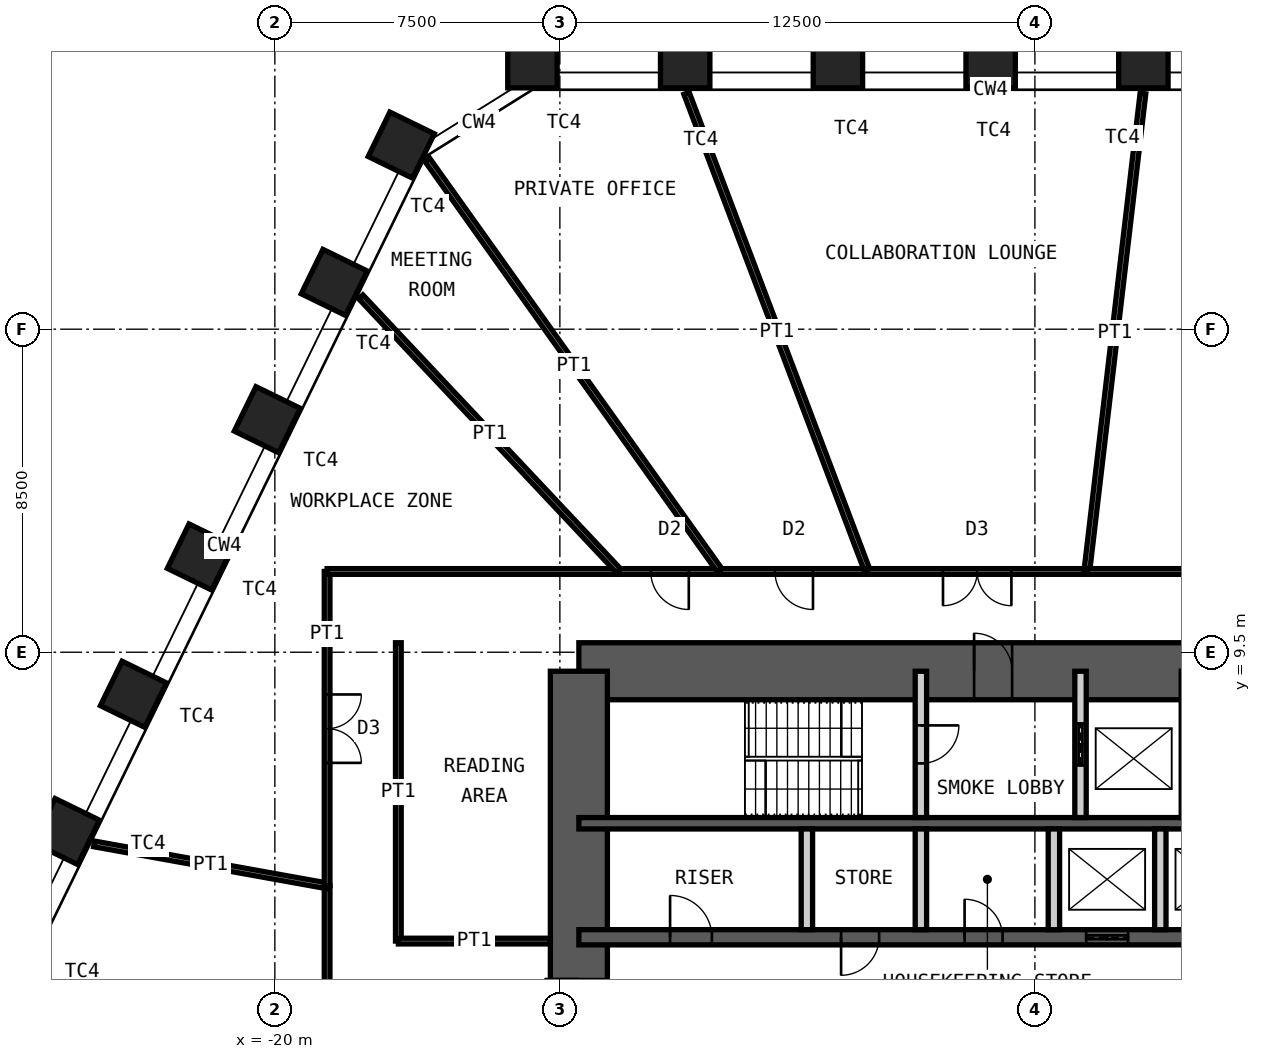
"""IFC4 building model, lengths in metres.
Left out: names, types, materials, properties, quantities, classifications, styles, units other than length and angle.
Written with IfcOpenShell. Run it as: python <this file> out.ifc"""

import sys

from ifc_helpers import new_model, si_unit, direction, frame, frame_2d, origin, origin_2d, place, context, subcontext, project, spatial, rectangle, hollow_rectangle, extrude, element, fill, save


model = new_model("IFC4")
c1 = context("Model", 3, precision=1e-05, world=origin(), true_north=direction((0.0, 1.0)))
c2 = subcontext(c1, "Body", "Model", "MODEL_VIEW")
j1 = project(units=[si_unit("LENGTHUNIT", "METRE"), si_unit("PLANEANGLEUNIT", "RADIAN")], contexts=[c1])
p1 = place(None, origin())
s1 = spatial("IfcSite", under=j1, at=p1, CompositionType="ELEMENT")
p2 = place(p1, origin())
s2 = spatial("IfcBuilding", under=s1, at=p2, CompositionType="ELEMENT")
p3 = place(p2, frame((0.0, 0.0, 153.4)))
s3 = spatial("IfcBuildingStorey", under=s2, at=p3, CompositionType="ELEMENT", Elevation=153.4)
for number, where, z_axis, x_axis in (
    (1, (-13.222, 25.0, 0.0), (0.0, 0.0, 1.0), (-1.0, 0.0, 0.0)),
    (2, (-9.203, 25.0, 0.0), (0.0, 0.0, 1.0), (-1.0, 0.0, 0.0)),
    (3, (-5.184, 25.0, 0.0), (0.0, 0.0, 1.0), (-1.0, 0.0, 0.0)),
    (4, (-1.165, 25.0, 0.0), (0.0, 0.0, 1.0), (-1.0, 0.0, 0.0)),
    (5, (2.854, 25.0, 0.0), (0.0, 0.0, 1.0), (-1.0, 0.0, 0.0)),
    (6, (-25.483, 4.781, 0.0), (0.0, 0.0, 1.0), (-0.438, -0.899, 0.0)),
    (7, (-23.721, 8.394, 0.0), (0.0, 0.0, 1.0), (-0.438, -0.899, 0.0)),
    (8, (-21.959, 12.006, 0.0), (0.0, 0.0, 1.0), (-0.438, -0.899, 0.0)),
    (9, (-20.198, 15.618, 0.0), (0.0, 0.0, 1.0), (-0.438, -0.899, 0.0)),
    (10, (-18.436, 19.23, 0.0), (0.0, 0.0, 1.0), (-0.438, -0.899, 0.0)),
    (11, (-16.674, 22.843, 0.0), (0.0, 0.0, 1.0), (-0.438, -0.899, 0.0)),
):
    element("IfcColumn", number, at=place(p3, frame(where, z_axis=z_axis, x_axis=x_axis)), inside=s3, PredefinedType="COLUMN", context=c2, shape_type="SweptSolid", body=[
        extrude(hollow_rectangle(XDim=1.3, YDim=1.3, WallThickness=0.1, at=origin_2d()), origin(), (0.0, 0.0, 1.0), 4.2),
    ])
p4 = place(p3, frame((-12.0, 9.0, 0.0), z_axis=(0.0, 0.0, 1.0), x_axis=(1.0, 0.0, 0.0)))
e12 = element("IfcWall", 12, at=p4, inside=s3, PredefinedType="SHEAR", context=c2, shape_type="SweptSolid", body=[
    extrude(rectangle(XDim=24.0, YDim=1.5, at=frame_2d((12.0, 0.0))), origin(), (0.0, 0.0, 1.0), 4.2),
])
p5 = place(p4, frame((10.4, 0.0, 0.0)))
e13 = element("IfcOpeningElement", 13, at=p5, cuts=e12, PredefinedType="OPENING", context=c2, shape_type="SweptSolid", body=[
    extrude(rectangle(XDim=1.0, YDim=2.1, at=frame_2d((0.5, 1.05))), frame((0.0, 0.76, 0.0), z_axis=(0.0, -1.0, 0.0), x_axis=(1.0, 0.0, 0.0)), (0.0, 0.0, 1.0), 1.52),
])
p6 = place(p4, frame((17.6, 0.0, 0.0)))
e14 = element("IfcOpeningElement", 14, at=p6, cuts=e12, PredefinedType="OPENING", context=c2, shape_type="SweptSolid", body=[
    extrude(rectangle(XDim=0.9, YDim=2.1, at=frame_2d((0.45, 1.05))), frame((0.0, 0.76, 0.0), z_axis=(0.0, -1.0, 0.0), x_axis=(1.0, 0.0, 0.0)), (0.0, 0.0, 1.0), 1.52),
])
p7 = place(p4, frame((21.9, 0.0, 0.0)))
e15 = element("IfcOpeningElement", 15, at=p7, cuts=e12, PredefinedType="OPENING", context=c2, shape_type="SweptSolid", body=[
    extrude(rectangle(XDim=0.9, YDim=2.1, at=frame_2d((0.45, 1.05))), frame((0.0, 0.76, 0.0), z_axis=(0.0, -1.0, 0.0), x_axis=(1.0, 0.0, 0.0)), (0.0, 0.0, 1.0), 1.52),
])
p8 = place(p3, frame((-12.0, -9.0, 0.0), z_axis=(0.0, 0.0, 1.0), x_axis=(0.0, 1.0, 0.0)))
e16 = element("IfcWall", 16, at=p8, inside=s3, PredefinedType="SHEAR", context=c2, shape_type="SweptSolid", body=[
    extrude(rectangle(XDim=18.0, YDim=1.5, at=frame_2d((9.0, 0.0))), origin(), (0.0, 0.0, 1.0), 4.2),
])
p9 = place(p8, frame((8.1, 0.0, 0.0)))
e17 = element("IfcOpeningElement", 17, at=p9, cuts=e16, PredefinedType="OPENING", context=c2, shape_type="SweptSolid", body=[
    extrude(rectangle(XDim=1.8, YDim=2.1, at=frame_2d((0.9, 1.05))), frame((0.0, 0.76, 0.0), z_axis=(0.0, -1.0, 0.0), x_axis=(1.0, 0.0, 0.0)), (0.0, 0.0, 1.0), 1.52),
])
p10 = place(p3, frame((-12.0, 5.0, 0.0), z_axis=(0.0, 0.0, 1.0), x_axis=(1.0, 0.0, 0.0)))
e18 = element("IfcWall", 18, at=p10, inside=s3, PredefinedType="SHEAR", context=c2, shape_type="SweptSolid", body=[
    extrude(rectangle(XDim=24.0, YDim=0.3, at=frame_2d((12.0, 0.0))), origin(), (0.0, 0.0, 1.0), 4.2),
])
p11 = place(p3, frame((-12.0, 2.0, 0.0), z_axis=(0.0, 0.0, 1.0), x_axis=(1.0, 0.0, 0.0)))
e19 = element("IfcWall", 19, at=p11, inside=s3, PredefinedType="SHEAR", context=c2, shape_type="SweptSolid", body=[
    extrude(rectangle(XDim=24.0, YDim=0.4, at=frame_2d((12.0, 0.0))), origin(), (0.0, 0.0, 1.0), 4.2),
])
p12 = place(p11, frame((2.4, 0.0, 0.0)))
e20 = element("IfcOpeningElement", 20, at=p12, cuts=e19, PredefinedType="OPENING", context=c2, shape_type="SweptSolid", body=[
    extrude(rectangle(XDim=1.1, YDim=2.1, at=frame_2d((0.55, 1.05))), frame((0.0, 0.21, 0.0), z_axis=(0.0, -1.0, 0.0), x_axis=(1.0, 0.0, 0.0)), (0.0, 0.0, 1.0), 0.42),
])
p13 = place(p11, frame((22.0, 0.0, 0.0)))
e21 = element("IfcOpeningElement", 21, at=p13, cuts=e19, PredefinedType="OPENING", context=c2, shape_type="SweptSolid", body=[
    extrude(rectangle(XDim=1.1, YDim=2.1, at=frame_2d((0.55, 1.05))), frame((0.0, 0.21, 0.0), z_axis=(0.0, -1.0, 0.0), x_axis=(1.0, 0.0, 0.0)), (0.0, 0.0, 1.0), 0.42),
])
p14 = place(p11, frame((10.15, 0.0, 0.0)))
e22 = element("IfcOpeningElement", 22, at=p14, cuts=e19, PredefinedType="OPENING", context=c2, shape_type="SweptSolid", body=[
    extrude(rectangle(XDim=1.0, YDim=2.1, at=frame_2d((0.5, 1.05))), frame((0.0, 0.21, 0.0), z_axis=(0.0, -1.0, 0.0), x_axis=(1.0, 0.0, 0.0)), (0.0, 0.0, 1.0), 0.42),
])
p15 = place(p11, frame((6.9, 0.0, 0.0)))
e23 = element("IfcOpeningElement", 23, at=p15, cuts=e19, PredefinedType="OPENING", context=c2, shape_type="SweptSolid", body=[
    extrude(rectangle(XDim=1.0, YDim=2.1, at=frame_2d((0.5, 1.05))), frame((0.0, 0.21, 0.0), z_axis=(0.0, -1.0, 0.0), x_axis=(1.0, 0.0, 0.0)), (0.0, 0.0, 1.0), 0.42),
])
p16 = place(p11, frame((13.35, 0.0, 0.0)))
e24 = element("IfcOpeningElement", 24, at=p16, cuts=e19, PredefinedType="OPENING", context=c2, shape_type="SweptSolid", body=[
    extrude(rectangle(XDim=1.1, YDim=2.4, at=frame_2d((0.55, 1.2))), frame((0.0, 0.21, 0.0), z_axis=(0.0, -1.0, 0.0), x_axis=(1.0, 0.0, 0.0)), (0.0, 0.0, 1.0), 0.42),
])
p17 = place(p11, frame((16.15, 0.0, 0.0)))
e25 = element("IfcOpeningElement", 25, at=p17, cuts=e19, PredefinedType="OPENING", context=c2, shape_type="SweptSolid", body=[
    extrude(rectangle(XDim=1.1, YDim=2.4, at=frame_2d((0.55, 1.2))), frame((0.0, 0.21, 0.0), z_axis=(0.0, -1.0, 0.0), x_axis=(1.0, 0.0, 0.0)), (0.0, 0.0, 1.0), 0.42),
])
p18 = place(p11, frame((18.95, 0.0, 0.0)))
e26 = element("IfcOpeningElement", 26, at=p18, cuts=e19, PredefinedType="OPENING", context=c2, shape_type="SweptSolid", body=[
    extrude(rectangle(XDim=1.1, YDim=2.4, at=frame_2d((0.55, 1.2))), frame((0.0, 0.21, 0.0), z_axis=(0.0, -1.0, 0.0), x_axis=(1.0, 0.0, 0.0)), (0.0, 0.0, 1.0), 0.42),
])
p19 = place(p3, frame((-3.0, 5.15, 0.0), z_axis=(0.0, 0.0, 1.0), x_axis=(0.0, 1.0, 0.0)))
e27 = element("IfcWall", 27, at=p19, inside=s3, PredefinedType="PARTITIONING", context=c2, shape_type="SweptSolid", body=[
    extrude(rectangle(XDim=3.85, YDim=0.3, at=frame_2d((1.925, 0.0))), origin(), (0.0, 0.0, 1.0), 3.98),
])
p20 = place(p19, frame((1.425, 0.0, 0.0)))
e28 = element("IfcOpeningElement", 28, at=p20, cuts=e27, PredefinedType="OPENING", context=c2, shape_type="SweptSolid", body=[
    extrude(rectangle(XDim=1.0, YDim=2.1, at=frame_2d((0.5, 1.05))), frame((0.0, 0.16, 0.0), z_axis=(0.0, -1.0, 0.0), x_axis=(1.0, 0.0, 0.0)), (0.0, 0.0, 1.0), 0.32),
])
p21 = place(p3, frame((1.2, 5.15, 0.0), z_axis=(0.0, 0.0, 1.0), x_axis=(0.0, 1.0, 0.0)))
e29 = element("IfcWall", 29, at=p21, inside=s3, PredefinedType="PARTITIONING", context=c2, shape_type="SweptSolid", body=[
    extrude(rectangle(XDim=3.85, YDim=0.3, at=frame_2d((1.925, 0.0))), origin(), (0.0, 0.0, 1.0), 3.98),
])
p22 = place(p21, frame((1.375, 0.0, 0.0)))
e30 = element("IfcOpeningElement", 30, at=p22, cuts=e29, PredefinedType="OPENING", context=c2, shape_type="SweptSolid", body=[
    extrude(rectangle(XDim=1.1, YDim=2.4, at=frame_2d((0.55, 1.2))), frame((0.0, 0.16, 0.0), z_axis=(0.0, -1.0, 0.0), x_axis=(1.0, 0.0, 0.0)), (0.0, 0.0, 1.0), 0.32),
])
p23 = place(p3, frame((4.0, 5.15, 0.0), z_axis=(0.0, 0.0, 1.0), x_axis=(0.0, 1.0, 0.0)))
e31 = element("IfcWall", 31, at=p23, inside=s3, PredefinedType="PARTITIONING", context=c2, shape_type="SweptSolid", body=[
    extrude(rectangle(XDim=3.85, YDim=0.3, at=frame_2d((1.925, 0.0))), origin(), (0.0, 0.0, 1.0), 3.98),
])
for number, where, z_axis, x_axis in (
    (32, (-6.0, 2.2, 0.0), (0.0, 0.0, 1.0), (0.0, 1.0, 0.0)),
    (33, (-3.0, 2.2, 0.0), (0.0, 0.0, 1.0), (0.0, 1.0, 0.0)),
    (34, (0.5, 2.2, 0.0), (0.0, 0.0, 1.0), (0.0, 1.0, 0.0)),
    (35, (3.3, 2.2, 0.0), (0.0, 0.0, 1.0), (0.0, 1.0, 0.0)),
):
    element("IfcWall", number, at=place(p3, frame(where, z_axis=z_axis, x_axis=x_axis)), inside=s3, PredefinedType="PARTITIONING", context=c2, shape_type="SweptSolid", body=[
        extrude(rectangle(XDim=2.65, YDim=0.3, at=frame_2d((1.325, 0.0))), origin(), (0.0, 0.0, 1.0), 3.98),
    ])
p24 = place(p3, frame((-18.625, -4.715, 0.0), z_axis=(0.0, 0.0, 1.0), x_axis=(0.0, 1.0, 0.0)))
e36 = element("IfcWall", 36, at=p24, inside=s3, PredefinedType="PARTITIONING", context=c2, shape_type="SweptSolid", body=[
    extrude(rectangle(XDim=8.068, YDim=0.15, at=frame_2d((4.034, 0.0))), origin(), (0.0, 0.0, 1.0), 4.03),
])
p25 = place(p24, frame((3.534, 0.0, 0.0)))
e37 = element("IfcOpeningElement", 37, at=p25, cuts=e36, PredefinedType="OPENING", context=c2, shape_type="SweptSolid", body=[
    extrude(rectangle(XDim=1.0, YDim=2.4, at=frame_2d((0.5, 1.2))), frame((0.0, 0.085, 0.0), z_axis=(0.0, -1.0, 0.0), x_axis=(1.0, 0.0, 0.0)), (0.0, 0.0, 1.0), 0.17),
])
p26 = place(p3, frame((-24.755, 4.457, 0.0), z_axis=(0.0, 0.0, 1.0), x_axis=(0.984175122587, -0.177198555524, 0.0)))
e38 = element("IfcWall", 38, at=p26, inside=s3, PredefinedType="PARTITIONING", context=c2, shape_type="SweptSolid", body=[
    extrude(rectangle(XDim=6.229, YDim=0.15, at=frame_2d((3.115, 0.0))), origin(), (0.0, 0.0, 1.0), 3.33),
])
p27 = place(p3, frame((-18.625, 3.353, 0.0), z_axis=(0.0, 0.0, 1.0), x_axis=(0.0, 1.0, 0.0)))
e39 = element("IfcWall", 39, at=p27, inside=s3, PredefinedType="PARTITIONING", context=c2, shape_type="SweptSolid", body=[
    extrude(rectangle(XDim=8.272, YDim=0.15, at=frame_2d((4.136, 0.0))), origin(), (0.0, 0.0, 1.0), 4.03),
])
p28 = place(p27, frame((3.236, 0.0, 0.0)))
e40 = element("IfcOpeningElement", 40, at=p28, cuts=e39, PredefinedType="OPENING", context=c2, shape_type="SweptSolid", body=[
    extrude(rectangle(XDim=1.8, YDim=2.4, at=frame_2d((0.9, 1.2))), frame((0.0, 0.085, 0.0), z_axis=(0.0, -1.0, 0.0), x_axis=(1.0, 0.0, 0.0)), (0.0, 0.0, 1.0), 0.17),
])
p29 = place(p3, frame((-18.625, 11.625, 0.0), z_axis=(0.0, 0.0, 1.0), x_axis=(1.0, 0.0, 0.0)))
e41 = element("IfcWall", 41, at=p29, inside=s3, PredefinedType="PARTITIONING", context=c2, shape_type="SweptSolid", body=[
    extrude(rectangle(XDim=7.686, YDim=0.15, at=frame_2d((3.843, 0.0))), origin(), (0.0, 0.0, 1.0), 4.03),
])
p30 = place(p3, frame((-17.738, 18.851, 0.0), z_axis=(0.0, 0.0, 1.0), x_axis=(0.685286406267, -0.728273672039, 0.0)))
e42 = element("IfcWall", 42, at=p30, inside=s3, PredefinedType="PARTITIONING", context=c2, shape_type="SweptSolid", body=[
    extrude(rectangle(XDim=9.922, YDim=0.15, at=frame_2d((4.961, 0.0))), origin(), (0.0, 0.0, 1.0), 3.33),
])
p31 = place(p3, frame((-10.939, 11.625, 0.0), z_axis=(0.0, 0.0, 1.0), x_axis=(1.0, 0.0, 0.0)))
e43 = element("IfcWall", 43, at=p31, inside=s3, PredefinedType="PARTITIONING", context=c2, shape_type="SweptSolid", body=[
    extrude(rectangle(XDim=2.662, YDim=0.15, at=frame_2d((1.331, 0.0))), origin(), (0.0, 0.0, 1.0), 4.03),
])
p32 = place(p31, frame((0.831, 0.0, 0.0)))
e44 = element("IfcOpeningElement", 44, at=p32, cuts=e43, PredefinedType="OPENING", context=c2, shape_type="SweptSolid", body=[
    extrude(rectangle(XDim=1.0, YDim=2.4, at=frame_2d((0.5, 1.2))), frame((0.0, 0.085, 0.0), z_axis=(0.0, -1.0, 0.0), x_axis=(1.0, 0.0, 0.0)), (0.0, 0.0, 1.0), 0.17),
])
p33 = place(p3, frame((-15.987, 22.455, 0.0), z_axis=(0.0, 0.0, 1.0), x_axis=(0.579969304452, -0.814638328274, 0.0)))
e45 = element("IfcWall", 45, at=p33, inside=s3, PredefinedType="PARTITIONING", context=c2, shape_type="SweptSolid", body=[
    extrude(rectangle(XDim=13.294, YDim=0.15, at=frame_2d((6.647, 0.0))), origin(), (0.0, 0.0, 1.0), 2.93),
])
p34 = place(p3, frame((-8.277, 11.625, 0.0), z_axis=(0.0, 0.0, 1.0), x_axis=(1.0, 0.0, 0.0)))
e46 = element("IfcWall", 46, at=p34, inside=s3, PredefinedType="PARTITIONING", context=c2, shape_type="SweptSolid", body=[
    extrude(rectangle(XDim=3.874, YDim=0.15, at=frame_2d((1.937, 0.0))), origin(), (0.0, 0.0, 1.0), 4.03),
])
p35 = place(p34, frame((1.437, 0.0, 0.0)))
e47 = element("IfcOpeningElement", 47, at=p35, cuts=e46, PredefinedType="OPENING", context=c2, shape_type="SweptSolid", body=[
    extrude(rectangle(XDim=1.0, YDim=2.4, at=frame_2d((0.5, 1.2))), frame((0.0, 0.085, 0.0), z_axis=(0.0, -1.0, 0.0), x_axis=(1.0, 0.0, 0.0)), (0.0, 0.0, 1.0), 0.17),
])
p36 = place(p3, frame((-9.167, 24.207, 0.0), z_axis=(0.0, 0.0, 1.0), x_axis=(0.354156368181, -0.935186220427, 0.0)))
e48 = element("IfcWall", 48, at=p36, inside=s3, PredefinedType="PARTITIONING", context=c2, shape_type="SweptSolid", body=[
    extrude(rectangle(XDim=13.454, YDim=0.15, at=frame_2d((6.727, 0.0))), origin(), (0.0, 0.0, 1.0), 3.33),
])
p37 = place(p3, frame((-4.403, 11.625, 0.0), z_axis=(0.0, 0.0, 1.0), x_axis=(1.0, 0.0, 0.0)))
e49 = element("IfcWall", 49, at=p37, inside=s3, PredefinedType="PARTITIONING", context=c2, shape_type="SweptSolid", body=[
    extrude(rectangle(XDim=5.768, YDim=0.15, at=frame_2d((2.884, 0.0))), origin(), (0.0, 0.0, 1.0), 4.03),
])
p38 = place(p37, frame((1.984, 0.0, 0.0)))
e50 = element("IfcOpeningElement", 50, at=p38, cuts=e49, PredefinedType="OPENING", context=c2, shape_type="SweptSolid", body=[
    extrude(rectangle(XDim=1.8, YDim=2.4, at=frame_2d((0.9, 1.2))), frame((0.0, 0.085, 0.0), z_axis=(0.0, -1.0, 0.0), x_axis=(1.0, 0.0, 0.0)), (0.0, 0.0, 1.0), 0.17),
])
p39 = place(p3, frame((2.843, 24.201, 0.0), z_axis=(0.0, 0.0, 1.0), x_axis=(-0.116670084723, -0.993170726175, 0.0)))
e51 = element("IfcWall", 51, at=p39, inside=s3, PredefinedType="PARTITIONING", context=c2, shape_type="SweptSolid", body=[
    extrude(rectangle(XDim=12.662, YDim=0.15, at=frame_2d((6.331, 0.0))), origin(), (0.0, 0.0, 1.0), 3.33),
])
p40 = place(p3, frame((1.366, 11.625, 0.0), z_axis=(0.0, 0.0, 1.0), x_axis=(1.0, 0.0, 0.0)))
e52 = element("IfcWall", 52, at=p40, inside=s3, PredefinedType="PARTITIONING", context=c2, shape_type="SweptSolid", body=[
    extrude(rectangle(XDim=8.46, YDim=0.15, at=frame_2d((4.23, 0.0))), origin(), (0.0, 0.0, 1.0), 4.03),
])
p41 = place(p40, frame((3.33, 0.0, 0.0)))
e53 = element("IfcOpeningElement", 53, at=p41, cuts=e52, PredefinedType="OPENING", context=c2, shape_type="SweptSolid", body=[
    extrude(rectangle(XDim=1.8, YDim=2.4, at=frame_2d((0.9, 1.2))), frame((0.0, 0.085, 0.0), z_axis=(0.0, -1.0, 0.0), x_axis=(1.0, 0.0, 0.0)), (0.0, 0.0, 1.0), 0.17),
])
p42 = place(p3, frame((-16.75, 1.9, 0.0), z_axis=(0.0, 0.0, 1.0), x_axis=(0.0, 1.0, 0.0)))
e54 = element("IfcWall", 54, at=p42, inside=s3, PredefinedType="PARTITIONING", context=c2, shape_type="SweptSolid", body=[
    extrude(rectangle(XDim=7.85, YDim=0.15, at=frame_2d((3.925, 0.0))), origin(), (0.0, 0.0, 1.0), 4.03),
])
p43 = place(p3, frame((-12.75, 1.9, 0.0), z_axis=(0.0, 0.0, 1.0), x_axis=(-1.0, 0.0, 0.0)))
e55 = element("IfcWall", 55, at=p43, inside=s3, PredefinedType="PARTITIONING", context=c2, shape_type="SweptSolid", body=[
    extrude(rectangle(XDim=4.0, YDim=0.15, at=frame_2d((2.0, 0.0))), origin(), (0.0, 0.0, 1.0), 3.33),
])
p44 = place(p5, origin())
e56 = element("IfcDoor", 56, at=p44, inside=s3, OperationType="SINGLE_SWING_RIGHT", PredefinedType="DOOR", context=c2, shape_type="SweptSolid", body=[
    extrude(rectangle(XDim=1.0, YDim=2.1, at=frame_2d((0.5, 1.05))), frame((0.0, 0.025, 0.0), z_axis=(0.0, -1.0, 0.0), x_axis=(1.0, 0.0, 0.0)), (0.0, 0.0, 1.0), 0.05),
])
fill(e13, e56)
p45 = place(p20, origin())
e57 = element("IfcDoor", 57, at=p45, inside=s3, OperationType="SINGLE_SWING_RIGHT", PredefinedType="DOOR", context=c2, shape_type="SweptSolid", body=[
    extrude(rectangle(XDim=1.0, YDim=2.1, at=frame_2d((0.5, 1.05))), frame((0.0, 0.025, 0.0), z_axis=(0.0, -1.0, 0.0), x_axis=(1.0, 0.0, 0.0)), (0.0, 0.0, 1.0), 0.05),
])
fill(e28, e57)
p46 = place(p12, origin())
e58 = element("IfcDoor", 58, at=p46, inside=s3, OperationType="SINGLE_SWING_RIGHT", PredefinedType="DOOR", context=c2, shape_type="SweptSolid", body=[
    extrude(rectangle(XDim=1.1, YDim=2.1, at=frame_2d((0.55, 1.05))), frame((0.0, 0.025, 0.0), z_axis=(0.0, -1.0, 0.0), x_axis=(1.0, 0.0, 0.0)), (0.0, 0.0, 1.0), 0.05),
])
fill(e20, e58)
p47 = place(p14, origin())
e59 = element("IfcDoor", 59, at=p47, inside=s3, OperationType="SINGLE_SWING_RIGHT", PredefinedType="DOOR", context=c2, shape_type="SweptSolid", body=[
    extrude(rectangle(XDim=1.0, YDim=2.1, at=frame_2d((0.5, 1.05))), frame((0.0, 0.025, 0.0), z_axis=(0.0, -1.0, 0.0), x_axis=(1.0, 0.0, 0.0)), (0.0, 0.0, 1.0), 0.05),
])
fill(e22, e59)
p48 = place(p9, origin())
e60 = element("IfcDoor", 60, at=p48, inside=s3, OperationType="DOUBLE_DOOR_DOUBLE_SWING", PredefinedType="DOOR", context=c2, shape_type="SweptSolid", body=[
    extrude(rectangle(XDim=1.8, YDim=2.1, at=frame_2d((0.9, 1.05))), frame((0.0, 0.025, 0.0), z_axis=(0.0, -1.0, 0.0), x_axis=(1.0, 0.0, 0.0)), (0.0, 0.0, 1.0), 0.05),
])
fill(e17, e60)
p49 = place(p22, origin())
e61 = element("IfcDoor", 61, at=p49, inside=s3, OperationType="DOUBLE_DOOR_SLIDING", PredefinedType="DOOR", context=c2, shape_type="SweptSolid", body=[
    extrude(rectangle(XDim=1.1, YDim=2.4, at=frame_2d((0.55, 1.2))), frame((0.0, 0.025, 0.0), z_axis=(0.0, -1.0, 0.0), x_axis=(1.0, 0.0, 0.0)), (0.0, 0.0, 1.0), 0.05),
])
fill(e30, e61)
p50 = place(p15, origin())
e62 = element("IfcDoor", 62, at=p50, inside=s3, OperationType="SINGLE_SWING_LEFT", PredefinedType="DOOR", context=c2, shape_type="SweptSolid", body=[
    extrude(rectangle(XDim=1.0, YDim=2.1, at=frame_2d((0.5, 1.05))), frame((0.0, 0.025, 0.0), z_axis=(0.0, -1.0, 0.0), x_axis=(1.0, 0.0, 0.0)), (0.0, 0.0, 1.0), 0.05),
])
fill(e23, e62)
p51 = place(p16, origin())
e63 = element("IfcDoor", 63, at=p51, inside=s3, OperationType="DOUBLE_DOOR_SLIDING", PredefinedType="DOOR", context=c2, shape_type="SweptSolid", body=[
    extrude(rectangle(XDim=1.1, YDim=2.4, at=frame_2d((0.55, 1.2))), frame((0.0, 0.025, 0.0), z_axis=(0.0, -1.0, 0.0), x_axis=(1.0, 0.0, 0.0)), (0.0, 0.0, 1.0), 0.05),
])
fill(e24, e63)
p52 = place(p28, origin())
e64 = element("IfcDoor", 64, at=p52, inside=s3, OperationType="DOUBLE_DOOR_DOUBLE_SWING", PredefinedType="DOOR", context=c2, shape_type="SweptSolid", body=[
    extrude(rectangle(XDim=1.8, YDim=2.4, at=frame_2d((0.9, 1.2))), frame((0.0, 0.025, 0.0), z_axis=(0.0, -1.0, 0.0), x_axis=(1.0, 0.0, 0.0)), (0.0, 0.0, 1.0), 0.05),
])
fill(e40, e64)
p53 = place(p32, origin())
e65 = element("IfcDoor", 65, at=p53, inside=s3, OperationType="SINGLE_SWING_RIGHT", PredefinedType="DOOR", context=c2, shape_type="SweptSolid", body=[
    extrude(rectangle(XDim=1.0, YDim=2.4, at=frame_2d((0.5, 1.2))), frame((0.0, 0.025, 0.0), z_axis=(0.0, -1.0, 0.0), x_axis=(1.0, 0.0, 0.0)), (0.0, 0.0, 1.0), 0.05),
])
fill(e44, e65)
p54 = place(p35, origin())
e66 = element("IfcDoor", 66, at=p54, inside=s3, OperationType="SINGLE_SWING_RIGHT", PredefinedType="DOOR", context=c2, shape_type="SweptSolid", body=[
    extrude(rectangle(XDim=1.0, YDim=2.4, at=frame_2d((0.5, 1.2))), frame((0.0, 0.025, 0.0), z_axis=(0.0, -1.0, 0.0), x_axis=(1.0, 0.0, 0.0)), (0.0, 0.0, 1.0), 0.05),
])
fill(e47, e66)
p55 = place(p38, origin())
e67 = element("IfcDoor", 67, at=p55, inside=s3, OperationType="DOUBLE_DOOR_DOUBLE_SWING", PredefinedType="DOOR", context=c2, shape_type="SweptSolid", body=[
    extrude(rectangle(XDim=1.8, YDim=2.4, at=frame_2d((0.9, 1.2))), frame((0.0, 0.025, 0.0), z_axis=(0.0, -1.0, 0.0), x_axis=(1.0, 0.0, 0.0)), (0.0, 0.0, 1.0), 0.05),
])
fill(e50, e67)
save(model, sys.argv[1])
